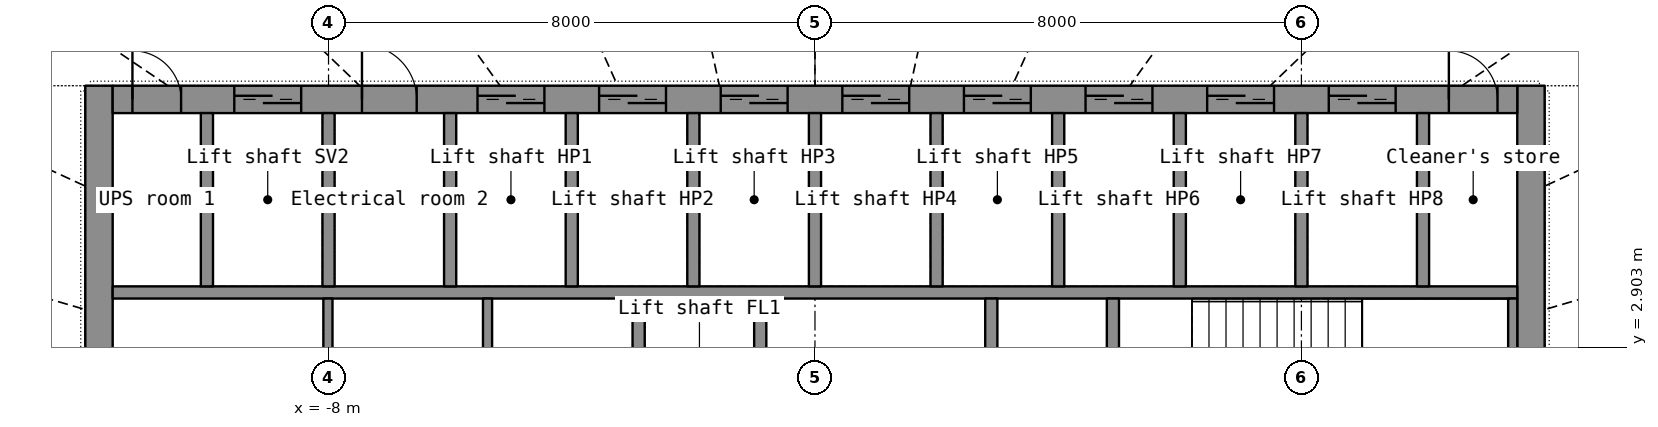
"""IFC4 building model, lengths in metres.
Left out: names, types, materials, properties, quantities, classifications, styles, units other than length and angle.
Written with IfcOpenShell. Run it as: python <this file> out.ifc"""

import sys

from ifc_helpers import new_model, si_unit, direction, frame, frame_2d, origin, place, context, subcontext, project, spatial, rectangle, extrude, element, fill, save


model = new_model("IFC4")
c1 = context("Model", 3, precision=1e-05, world=origin(), true_north=direction((0.0, 1.0)))
c2 = subcontext(c1, "Body", "Model", "MODEL_VIEW")
j1 = project(units=[si_unit("LENGTHUNIT", "METRE"), si_unit("PLANEANGLEUNIT", "RADIAN")], contexts=[c1])
p1 = place(None, origin())
s1 = spatial("IfcSite", under=j1, at=p1, CompositionType="ELEMENT")
p2 = place(p1, origin())
s2 = spatial("IfcBuilding", under=s1, at=p2, CompositionType="ELEMENT")
p3 = place(p2, frame((0.0, 0.0, 164.5)))
s3 = spatial("IfcBuildingStorey", under=s2, at=p3, CompositionType="ELEMENT", Elevation=164.5)
p4 = place(p3, frame((-11.775, -7.2, 0.0), z_axis=(0.0, 0.0, 1.0), x_axis=(0.0, 1.0, 0.0)))
e1 = element("IfcWall", 1, at=p4, inside=s3, PredefinedType="SHEAR", context=c2, shape_type="SweptSolid", body=[
    extrude(rectangle(XDim=14.4, YDim=0.45, at=frame_2d((7.2, 0.0))), origin(), (0.0, 0.0, 1.0), 3.3),
])
p5 = place(p4, frame((6.5, 0.0, 0.0)))
e2 = element("IfcOpeningElement", 2, at=p5, cuts=e1, PredefinedType="OPENING", context=c2, shape_type="SweptSolid", body=[
    extrude(rectangle(XDim=1.4, YDim=2.2, at=frame_2d((0.7, 1.1))), frame((0.0, 0.235, 0.0), z_axis=(0.0, -1.0, 0.0), x_axis=(1.0, 0.0, 0.0)), (0.0, 0.0, 1.0), 0.47),
])
p6 = place(p3, frame((11.775, -7.2, 0.0), z_axis=(0.0, 0.0, 1.0), x_axis=(0.0, 1.0, 0.0)))
e3 = element("IfcWall", 3, at=p6, inside=s3, PredefinedType="SHEAR", context=c2, shape_type="SweptSolid", body=[
    extrude(rectangle(XDim=14.4, YDim=0.45, at=frame_2d((7.2, 0.0))), origin(), (0.0, 0.0, 1.0), 3.3),
])
p7 = place(p6, frame((6.5, 0.0, 0.0)))
e4 = element("IfcOpeningElement", 4, at=p7, cuts=e3, PredefinedType="OPENING", context=c2, shape_type="SweptSolid", body=[
    extrude(rectangle(XDim=1.4, YDim=2.2, at=frame_2d((0.7, 1.1))), frame((0.0, 0.235, 0.0), z_axis=(0.0, -1.0, 0.0), x_axis=(1.0, 0.0, 0.0)), (0.0, 0.0, 1.0), 0.47),
])
p8 = place(p3, frame((-11.55, 6.975, 0.0), z_axis=(0.0, 0.0, 1.0), x_axis=(1.0, 0.0, 0.0)))
e5 = element("IfcWall", 5, at=p8, inside=s3, PredefinedType="SHEAR", context=c2, shape_type="SweptSolid", body=[
    extrude(rectangle(XDim=23.1, YDim=0.45, at=frame_2d((11.55, 0.0))), origin(), (0.0, 0.0, 1.0), 3.3),
])
p9 = place(p8, frame((2.0, 0.0, 0.0)))
e6 = element("IfcOpeningElement", 6, at=p9, cuts=e5, PredefinedType="OPENING", context=c2, shape_type="SweptSolid", body=[
    extrude(rectangle(XDim=1.1, YDim=2.2, at=frame_2d((0.55, 1.1))), frame((0.0, 0.235, 0.0), z_axis=(0.0, -1.0, 0.0), x_axis=(1.0, 0.0, 0.0)), (0.0, 0.0, 1.0), 0.47),
])
p10 = place(p8, frame((6.0, 0.0, 0.0)))
e7 = element("IfcOpeningElement", 7, at=p10, cuts=e5, PredefinedType="OPENING", context=c2, shape_type="SweptSolid", body=[
    extrude(rectangle(XDim=1.1, YDim=2.2, at=frame_2d((0.55, 1.1))), frame((0.0, 0.235, 0.0), z_axis=(0.0, -1.0, 0.0), x_axis=(1.0, 0.0, 0.0)), (0.0, 0.0, 1.0), 0.47),
])
p11 = place(p8, frame((8.0, 0.0, 0.0)))
e8 = element("IfcOpeningElement", 8, at=p11, cuts=e5, PredefinedType="OPENING", context=c2, shape_type="SweptSolid", body=[
    extrude(rectangle(XDim=1.1, YDim=2.2, at=frame_2d((0.55, 1.1))), frame((0.0, 0.235, 0.0), z_axis=(0.0, -1.0, 0.0), x_axis=(1.0, 0.0, 0.0)), (0.0, 0.0, 1.0), 0.47),
])
p12 = place(p8, frame((10.0, 0.0, 0.0)))
e9 = element("IfcOpeningElement", 9, at=p12, cuts=e5, PredefinedType="OPENING", context=c2, shape_type="SweptSolid", body=[
    extrude(rectangle(XDim=1.1, YDim=2.2, at=frame_2d((0.55, 1.1))), frame((0.0, 0.235, 0.0), z_axis=(0.0, -1.0, 0.0), x_axis=(1.0, 0.0, 0.0)), (0.0, 0.0, 1.0), 0.47),
])
p13 = place(p8, frame((12.0, 0.0, 0.0)))
e10 = element("IfcOpeningElement", 10, at=p13, cuts=e5, PredefinedType="OPENING", context=c2, shape_type="SweptSolid", body=[
    extrude(rectangle(XDim=1.1, YDim=2.2, at=frame_2d((0.55, 1.1))), frame((0.0, 0.235, 0.0), z_axis=(0.0, -1.0, 0.0), x_axis=(1.0, 0.0, 0.0)), (0.0, 0.0, 1.0), 0.47),
])
p14 = place(p8, frame((14.0, 0.0, 0.0)))
e11 = element("IfcOpeningElement", 11, at=p14, cuts=e5, PredefinedType="OPENING", context=c2, shape_type="SweptSolid", body=[
    extrude(rectangle(XDim=1.1, YDim=2.2, at=frame_2d((0.55, 1.1))), frame((0.0, 0.235, 0.0), z_axis=(0.0, -1.0, 0.0), x_axis=(1.0, 0.0, 0.0)), (0.0, 0.0, 1.0), 0.47),
])
p15 = place(p8, frame((16.0, 0.0, 0.0)))
e12 = element("IfcOpeningElement", 12, at=p15, cuts=e5, PredefinedType="OPENING", context=c2, shape_type="SweptSolid", body=[
    extrude(rectangle(XDim=1.1, YDim=2.2, at=frame_2d((0.55, 1.1))), frame((0.0, 0.235, 0.0), z_axis=(0.0, -1.0, 0.0), x_axis=(1.0, 0.0, 0.0)), (0.0, 0.0, 1.0), 0.47),
])
p16 = place(p8, frame((18.0, 0.0, 0.0)))
e13 = element("IfcOpeningElement", 13, at=p16, cuts=e5, PredefinedType="OPENING", context=c2, shape_type="SweptSolid", body=[
    extrude(rectangle(XDim=1.1, YDim=2.2, at=frame_2d((0.55, 1.1))), frame((0.0, 0.235, 0.0), z_axis=(0.0, -1.0, 0.0), x_axis=(1.0, 0.0, 0.0)), (0.0, 0.0, 1.0), 0.47),
])
p17 = place(p8, frame((20.0, 0.0, 0.0)))
e14 = element("IfcOpeningElement", 14, at=p17, cuts=e5, PredefinedType="OPENING", context=c2, shape_type="SweptSolid", body=[
    extrude(rectangle(XDim=1.1, YDim=2.2, at=frame_2d((0.55, 1.1))), frame((0.0, 0.235, 0.0), z_axis=(0.0, -1.0, 0.0), x_axis=(1.0, 0.0, 0.0)), (0.0, 0.0, 1.0), 0.47),
])
p18 = place(p8, frame((4.1, 0.0, 0.0)))
e15 = element("IfcOpeningElement", 15, at=p18, cuts=e5, PredefinedType="OPENING", context=c2, shape_type="SweptSolid", body=[
    extrude(rectangle(XDim=0.9, YDim=2.1, at=frame_2d((0.45, 1.05))), frame((0.0, 0.235, 0.0), z_axis=(0.0, -1.0, 0.0), x_axis=(1.0, 0.0, 0.0)), (0.0, 0.0, 1.0), 0.47),
])
p19 = place(p8, frame((0.325, 0.0, 0.0)))
e16 = element("IfcOpeningElement", 16, at=p19, cuts=e5, PredefinedType="OPENING", context=c2, shape_type="SweptSolid", body=[
    extrude(rectangle(XDim=0.8, YDim=2.05, at=frame_2d((0.4, 1.025))), frame((0.0, 0.235, 0.0), z_axis=(0.0, -1.0, 0.0), x_axis=(1.0, 0.0, 0.0)), (0.0, 0.0, 1.0), 0.47),
])
p20 = place(p8, frame((21.975, 0.0, 0.0)))
e17 = element("IfcOpeningElement", 17, at=p20, cuts=e5, PredefinedType="OPENING", context=c2, shape_type="SweptSolid", body=[
    extrude(rectangle(XDim=0.8, YDim=2.05, at=frame_2d((0.4, 1.025))), frame((0.0, 0.235, 0.0), z_axis=(0.0, -1.0, 0.0), x_axis=(1.0, 0.0, 0.0)), (0.0, 0.0, 1.0), 0.47),
])
p21 = place(p3, frame((-11.55, 3.8, 0.0), z_axis=(0.0, 0.0, 1.0), x_axis=(1.0, 0.0, 0.0)))
e18 = element("IfcWall", 18, at=p21, inside=s3, PredefinedType="SHEAR", context=c2, shape_type="SweptSolid", body=[
    extrude(rectangle(XDim=23.1, YDim=0.2, at=frame_2d((11.55, 0.0))), origin(), (0.0, 0.0, 1.0), 3.3),
])
for number, where, z_axis, x_axis in (
    (19, (-10.0, 3.9, 0.0), (0.0, 0.0, 1.0), (0.0, 1.0, 0.0)),
    (20, (-8.0, 3.9, 0.0), (0.0, 0.0, 1.0), (0.0, 1.0, 0.0)),
    (21, (-6.0, 3.9, 0.0), (0.0, 0.0, 1.0), (0.0, 1.0, 0.0)),
    (22, (-4.0, 3.9, 0.0), (0.0, 0.0, 1.0), (0.0, 1.0, 0.0)),
    (23, (-2.0, 3.9, 0.0), (0.0, 0.0, 1.0), (0.0, 1.0, 0.0)),
    (24, (0.0, 3.9, 0.0), (0.0, 0.0, 1.0), (0.0, 1.0, 0.0)),
    (25, (2.0, 3.9, 0.0), (0.0, 0.0, 1.0), (0.0, 1.0, 0.0)),
    (26, (4.0, 3.9, 0.0), (0.0, 0.0, 1.0), (0.0, 1.0, 0.0)),
    (27, (6.0, 3.9, 0.0), (0.0, 0.0, 1.0), (0.0, 1.0, 0.0)),
    (28, (8.0, 3.9, 0.0), (0.0, 0.0, 1.0), (0.0, 1.0, 0.0)),
    (29, (10.0, 3.9, 0.0), (0.0, 0.0, 1.0), (0.0, 1.0, 0.0)),
):
    element("IfcWall", number, at=place(p3, frame(where, z_axis=z_axis, x_axis=x_axis)), inside=s3, PredefinedType="SHEAR", context=c2, shape_type="SweptSolid", body=[
        extrude(rectangle(XDim=2.85, YDim=0.2, at=frame_2d((1.425, 0.0))), origin(), (0.0, 0.0, 1.0), 3.3),
    ])
p22 = place(p3, frame((-2.9, -3.7, 0.0), z_axis=(0.0, 0.0, 1.0), x_axis=(0.0, 1.0, 0.0)))
e30 = element("IfcWall", 30, at=p22, inside=s3, PredefinedType="SHEAR", context=c2, shape_type="SweptSolid", body=[
    extrude(rectangle(XDim=7.4, YDim=0.2, at=frame_2d((3.7, 0.0))), origin(), (0.0, 0.0, 1.0), 3.3),
])
p23 = place(p22, frame((3.1, 0.0, 0.0)))
e31 = element("IfcOpeningElement", 31, at=p23, cuts=e30, PredefinedType="OPENING", context=c2, shape_type="SweptSolid", body=[
    extrude(rectangle(XDim=1.2, YDim=2.2, at=frame_2d((0.6, 1.1))), frame((0.0, 0.11, 0.0), z_axis=(0.0, -1.0, 0.0), x_axis=(1.0, 0.0, 0.0)), (0.0, 0.0, 1.0), 0.22),
])
p24 = place(p3, frame((2.9, -3.7, 0.0), z_axis=(0.0, 0.0, 1.0), x_axis=(0.0, 1.0, 0.0)))
e32 = element("IfcWall", 32, at=p24, inside=s3, PredefinedType="SHEAR", context=c2, shape_type="SweptSolid", body=[
    extrude(rectangle(XDim=7.4, YDim=0.2, at=frame_2d((3.7, 0.0))), origin(), (0.0, 0.0, 1.0), 3.3),
])
p25 = place(p24, frame((3.1, 0.0, 0.0)))
e33 = element("IfcOpeningElement", 33, at=p25, cuts=e32, PredefinedType="OPENING", context=c2, shape_type="SweptSolid", body=[
    extrude(rectangle(XDim=1.2, YDim=2.2, at=frame_2d((0.6, 1.1))), frame((0.0, 0.11, 0.0), z_axis=(0.0, -1.0, 0.0), x_axis=(1.0, 0.0, 0.0)), (0.0, 0.0, 1.0), 0.22),
])
p26 = place(p3, frame((-0.9, 1.35, 0.0), z_axis=(0.0, 0.0, 1.0), x_axis=(0.0, 1.0, 0.0)))
e34 = element("IfcWall", 34, at=p26, inside=s3, PredefinedType="SHEAR", context=c2, shape_type="SweptSolid", body=[
    extrude(rectangle(XDim=2.35, YDim=0.2, at=frame_2d((1.175, 0.0))), origin(), (0.0, 0.0, 1.0), 3.3),
])
p27 = place(p3, frame((11.475, 1.35, 0.0), z_axis=(0.0, 0.0, 1.0), x_axis=(0.0, 1.0, 0.0)))
e35 = element("IfcWall", 35, at=p27, inside=s3, PredefinedType="SHEAR", context=c2, shape_type="SweptSolid", body=[
    extrude(rectangle(XDim=2.35, YDim=0.15, at=frame_2d((1.175, 0.0))), origin(), (0.0, 0.0, 1.0), 3.3),
])
p28 = place(p3, frame((4.9, 1.35, 0.0), z_axis=(0.0, 0.0, 1.0), x_axis=(0.0, 1.0, 0.0)))
e36 = element("IfcWall", 36, at=p28, inside=s3, PredefinedType="SHEAR", context=c2, shape_type="SweptSolid", body=[
    extrude(rectangle(XDim=2.35, YDim=0.2, at=frame_2d((1.175, 0.0))), origin(), (0.0, 0.0, 1.0), 3.3),
])
for number, where, z_axis, x_axis in (
    (37, (-8.01, 1.35, 0.0), (0.0, 0.0, 1.0), (0.0, 1.0, 0.0)),
    (38, (-5.385, 1.35, 0.0), (0.0, 0.0, 1.0), (0.0, 1.0, 0.0)),
):
    element("IfcWall", number, at=place(p3, frame(where, z_axis=z_axis, x_axis=x_axis)), inside=s3, PredefinedType="PARTITIONING", context=c2, shape_type="SweptSolid", body=[
        extrude(rectangle(XDim=2.35, YDim=0.15, at=frame_2d((1.175, 0.0))), origin(), (0.0, 0.0, 1.0), 3.3),
    ])
p29 = place(p9, origin())
e39 = element("IfcDoor", 39, at=p29, inside=s3, OperationType="DOUBLE_DOOR_SLIDING", PredefinedType="DOOR", context=c2, shape_type="SweptSolid", body=[
    extrude(rectangle(XDim=1.1, YDim=2.2, at=frame_2d((0.55, 1.1))), frame((0.0, 0.025, 0.0), z_axis=(0.0, -1.0, 0.0), x_axis=(1.0, 0.0, 0.0)), (0.0, 0.0, 1.0), 0.05),
])
fill(e6, e39)
p30 = place(p10, origin())
e40 = element("IfcDoor", 40, at=p30, inside=s3, OperationType="DOUBLE_DOOR_SLIDING", PredefinedType="DOOR", context=c2, shape_type="SweptSolid", body=[
    extrude(rectangle(XDim=1.1, YDim=2.2, at=frame_2d((0.55, 1.1))), frame((0.0, 0.025, 0.0), z_axis=(0.0, -1.0, 0.0), x_axis=(1.0, 0.0, 0.0)), (0.0, 0.0, 1.0), 0.05),
])
fill(e7, e40)
p31 = place(p11, origin())
e41 = element("IfcDoor", 41, at=p31, inside=s3, OperationType="DOUBLE_DOOR_SLIDING", PredefinedType="DOOR", context=c2, shape_type="SweptSolid", body=[
    extrude(rectangle(XDim=1.1, YDim=2.2, at=frame_2d((0.55, 1.1))), frame((0.0, 0.025, 0.0), z_axis=(0.0, -1.0, 0.0), x_axis=(1.0, 0.0, 0.0)), (0.0, 0.0, 1.0), 0.05),
])
fill(e8, e41)
p32 = place(p12, origin())
e42 = element("IfcDoor", 42, at=p32, inside=s3, OperationType="DOUBLE_DOOR_SLIDING", PredefinedType="DOOR", context=c2, shape_type="SweptSolid", body=[
    extrude(rectangle(XDim=1.1, YDim=2.2, at=frame_2d((0.55, 1.1))), frame((0.0, 0.025, 0.0), z_axis=(0.0, -1.0, 0.0), x_axis=(1.0, 0.0, 0.0)), (0.0, 0.0, 1.0), 0.05),
])
fill(e9, e42)
p33 = place(p13, origin())
e43 = element("IfcDoor", 43, at=p33, inside=s3, OperationType="DOUBLE_DOOR_SLIDING", PredefinedType="DOOR", context=c2, shape_type="SweptSolid", body=[
    extrude(rectangle(XDim=1.1, YDim=2.2, at=frame_2d((0.55, 1.1))), frame((0.0, 0.025, 0.0), z_axis=(0.0, -1.0, 0.0), x_axis=(1.0, 0.0, 0.0)), (0.0, 0.0, 1.0), 0.05),
])
fill(e10, e43)
p34 = place(p14, origin())
e44 = element("IfcDoor", 44, at=p34, inside=s3, OperationType="DOUBLE_DOOR_SLIDING", PredefinedType="DOOR", context=c2, shape_type="SweptSolid", body=[
    extrude(rectangle(XDim=1.1, YDim=2.2, at=frame_2d((0.55, 1.1))), frame((0.0, 0.025, 0.0), z_axis=(0.0, -1.0, 0.0), x_axis=(1.0, 0.0, 0.0)), (0.0, 0.0, 1.0), 0.05),
])
fill(e11, e44)
p35 = place(p15, origin())
e45 = element("IfcDoor", 45, at=p35, inside=s3, OperationType="DOUBLE_DOOR_SLIDING", PredefinedType="DOOR", context=c2, shape_type="SweptSolid", body=[
    extrude(rectangle(XDim=1.1, YDim=2.2, at=frame_2d((0.55, 1.1))), frame((0.0, 0.025, 0.0), z_axis=(0.0, -1.0, 0.0), x_axis=(1.0, 0.0, 0.0)), (0.0, 0.0, 1.0), 0.05),
])
fill(e12, e45)
p36 = place(p16, origin())
e46 = element("IfcDoor", 46, at=p36, inside=s3, OperationType="DOUBLE_DOOR_SLIDING", PredefinedType="DOOR", context=c2, shape_type="SweptSolid", body=[
    extrude(rectangle(XDim=1.1, YDim=2.2, at=frame_2d((0.55, 1.1))), frame((0.0, 0.025, 0.0), z_axis=(0.0, -1.0, 0.0), x_axis=(1.0, 0.0, 0.0)), (0.0, 0.0, 1.0), 0.05),
])
fill(e13, e46)
p37 = place(p17, origin())
e47 = element("IfcDoor", 47, at=p37, inside=s3, OperationType="DOUBLE_DOOR_SLIDING", PredefinedType="DOOR", context=c2, shape_type="SweptSolid", body=[
    extrude(rectangle(XDim=1.1, YDim=2.2, at=frame_2d((0.55, 1.1))), frame((0.0, 0.025, 0.0), z_axis=(0.0, -1.0, 0.0), x_axis=(1.0, 0.0, 0.0)), (0.0, 0.0, 1.0), 0.05),
])
fill(e14, e47)
p38 = place(p18, origin())
e48 = element("IfcDoor", 48, at=p38, inside=s3, OperationType="SINGLE_SWING_LEFT", PredefinedType="DOOR", context=c2, shape_type="SweptSolid", body=[
    extrude(rectangle(XDim=0.9, YDim=2.1, at=frame_2d((0.45, 1.05))), frame((0.0, 0.025, 0.0), z_axis=(0.0, -1.0, 0.0), x_axis=(1.0, 0.0, 0.0)), (0.0, 0.0, 1.0), 0.05),
])
fill(e15, e48)
p39 = place(p19, origin())
e49 = element("IfcDoor", 49, at=p39, inside=s3, OperationType="SINGLE_SWING_LEFT", PredefinedType="DOOR", context=c2, shape_type="SweptSolid", body=[
    extrude(rectangle(XDim=0.8, YDim=2.05, at=frame_2d((0.4, 1.025))), frame((0.0, 0.025, 0.0), z_axis=(0.0, -1.0, 0.0), x_axis=(1.0, 0.0, 0.0)), (0.0, 0.0, 1.0), 0.05),
])
fill(e16, e49)
p40 = place(p20, origin())
e50 = element("IfcDoor", 50, at=p40, inside=s3, OperationType="SINGLE_SWING_LEFT", PredefinedType="DOOR", context=c2, shape_type="SweptSolid", body=[
    extrude(rectangle(XDim=0.8, YDim=2.05, at=frame_2d((0.4, 1.025))), frame((0.0, 0.025, 0.0), z_axis=(0.0, -1.0, 0.0), x_axis=(1.0, 0.0, 0.0)), (0.0, 0.0, 1.0), 0.05),
])
fill(e17, e50)
save(model, sys.argv[1])
